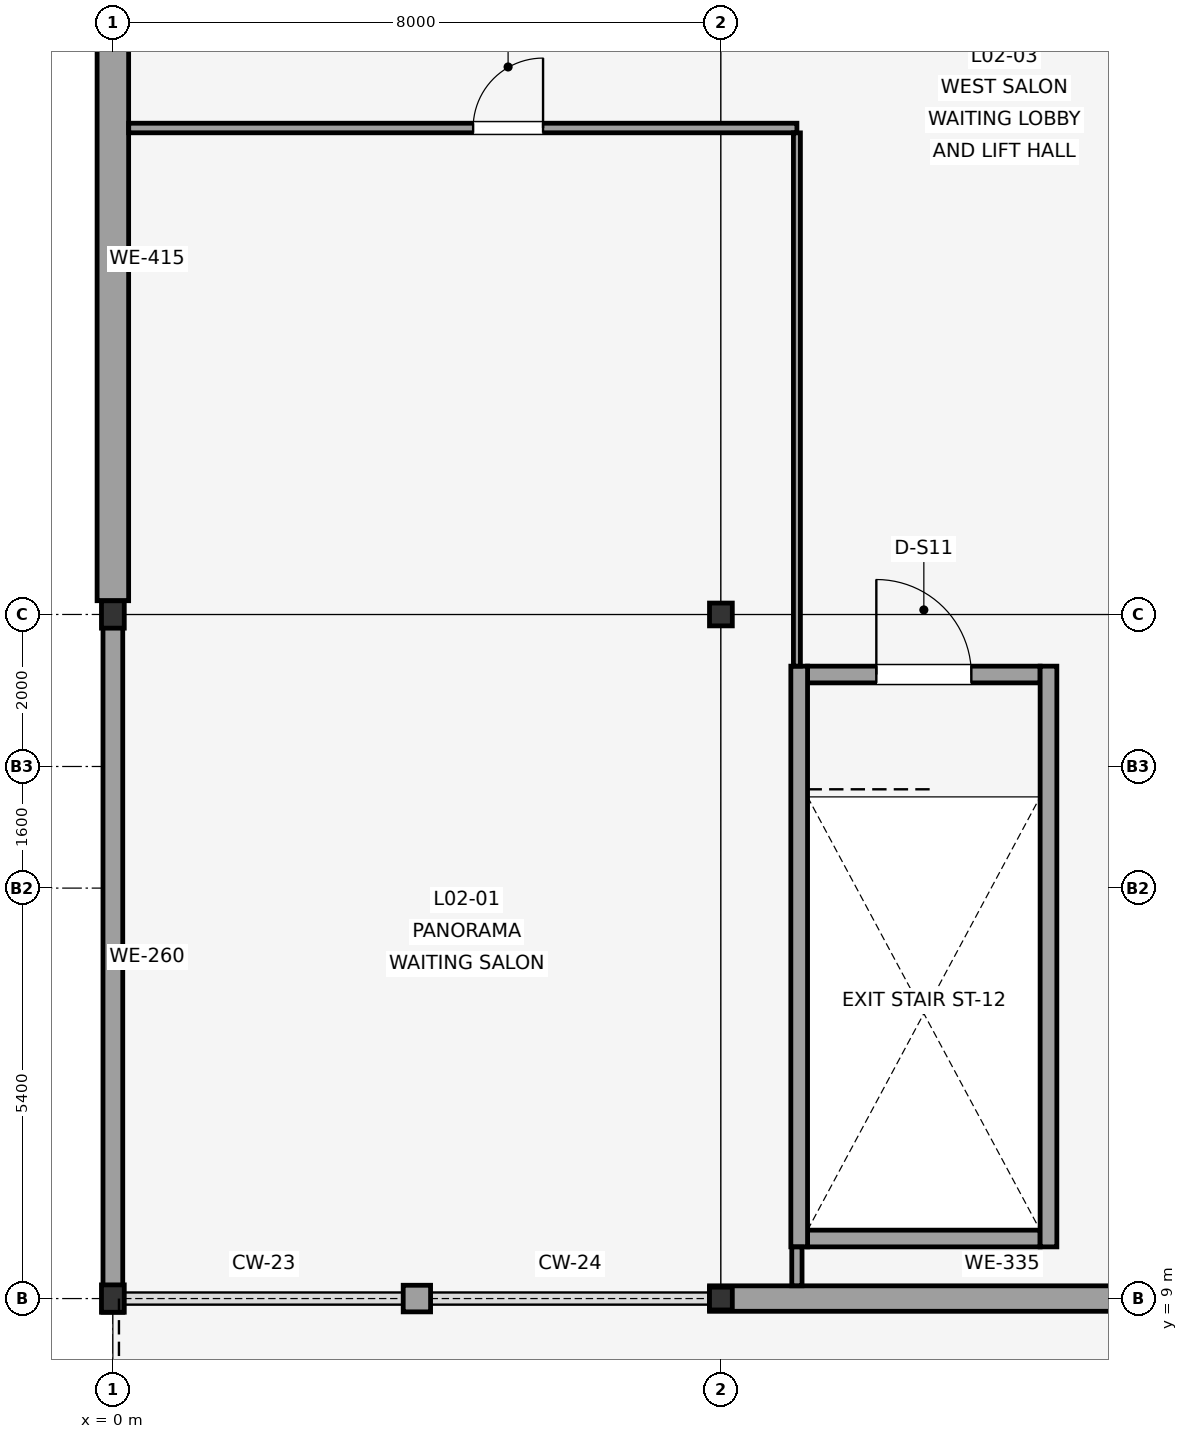
"""IFC4 building model, lengths in metres.
Left out: names, types, materials, properties, quantities, classifications, styles, units other than length and angle.
Written with IfcOpenShell. Run it as: python <this file> out.ifc"""

import sys

from ifc_helpers import new_model, si_unit, direction, frame, frame_2d, origin, origin_2d, place, context, subcontext, project, spatial, rectangle, i_section, extrude, element, fill, save


model = new_model("IFC4")
c1 = context("Model", 3, precision=1e-05, world=origin(), true_north=direction((0.0, 1.0)))
c2 = subcontext(c1, "Body", "Model", "MODEL_VIEW")
j1 = project(units=[si_unit("LENGTHUNIT", "METRE"), si_unit("PLANEANGLEUNIT", "RADIAN")], contexts=[c1])
p1 = place(None, origin())
s1 = spatial("IfcSite", under=j1, at=p1, CompositionType="ELEMENT")
p2 = place(p1, origin())
s2 = spatial("IfcBuilding", under=s1, at=p2, CompositionType="ELEMENT")
p3 = place(p2, frame((0.0, 0.0, 9.0)))
s3 = spatial("IfcBuildingStorey", under=s2, at=p3, CompositionType="ELEMENT", Elevation=9.0)
for number, where, z_axis, x_axis in (
    (1, (0.0, 9.0, 0.0), (0.0, 0.0, 1.0), (1.0, 0.0, 0.0)),
    (2, (0.0, 18.0, 0.0), (0.0, 0.0, 1.0), (1.0, 0.0, 0.0)),
):
    element("IfcColumn", number, at=place(p3, frame(where, z_axis=z_axis, x_axis=x_axis)), inside=s3, PredefinedType="COLUMN", context=c2, shape_type="SweptSolid", body=[
        extrude(i_section(OverallWidth=0.3, OverallDepth=0.36, WebThickness=0.012, FlangeThickness=0.022, FilletRadius=0.027, at=origin_2d()), origin(), (0.0, 0.0, 1.0), 4.8),
    ])
for number, where, z_axis, x_axis in (
    (3, (8.0, 9.0, 0.0), (0.0, 0.0, 1.0), (1.0, 0.0, 0.0)),
    (4, (8.0, 18.0, 0.0), (0.0, 0.0, 1.0), (1.0, 0.0, 0.0)),
):
    element("IfcColumn", number, at=place(p3, frame(where, z_axis=z_axis, x_axis=x_axis)), inside=s3, PredefinedType="COLUMN", context=c2, shape_type="SweptSolid", body=[
        extrude(i_section(OverallWidth=0.3, OverallDepth=0.3, WebThickness=0.011, FlangeThickness=0.019, FilletRadius=0.027, at=origin_2d()), origin(), (0.0, 0.0, 1.0), 4.8),
    ])
p4 = place(p3, frame((3.82, 9.0, 0.0), z_axis=(0.0, 0.0, 1.0), x_axis=(1.0, 0.0, 0.0)))
e5 = element("IfcWall", 5, at=p4, inside=s3, PredefinedType="SOLIDWALL", context=c2, shape_type="SweptSolid", body=[
    extrude(rectangle(XDim=0.36, YDim=0.35, at=frame_2d((0.18, 0.0))), origin(), (0.0, 0.0, 1.0), 3.42),
])
p5 = place(p3, frame((7.85, 9.0, 0.0), z_axis=(0.0, 0.0, 1.0), x_axis=(1.0, 0.0, 0.0)))
e6 = element("IfcWall", 6, at=p5, inside=s3, PredefinedType="SOLIDWALL", context=c2, shape_type="SweptSolid", body=[
    extrude(rectangle(XDim=8.3, YDim=0.335, at=frame_2d((4.15, 0.0))), origin(), (0.0, 0.0, 1.0), 3.42),
])
p6 = place(p5, frame((5.45, 0.0, 0.0)))
e7 = element("IfcOpeningElement", 7, at=p6, cuts=e6, PredefinedType="OPENING", context=c2, shape_type="SweptSolid", body=[
    extrude(rectangle(XDim=1.65, YDim=2.3, at=frame_2d((0.825, 1.15))), frame((0.0, 0.177, 0.0), z_axis=(0.0, -1.0, 0.0), x_axis=(1.0, 0.0, 0.0)), (0.0, 0.0, 1.0), 0.355),
])
p7 = place(p3, frame((0.0, 18.18, 0.0), z_axis=(0.0, 0.0, 1.0), x_axis=(0.0, -1.0, 0.0)))
e8 = element("IfcWall", 8, at=p7, inside=s3, PredefinedType="SOLIDWALL", context=c2, shape_type="SweptSolid", body=[
    extrude(rectangle(XDim=9.36, YDim=0.26, at=frame_2d((4.68, 0.0))), origin(), (0.0, 0.0, 1.0), 3.42),
])
p8 = place(p3, frame((0.0, 27.18, 0.0), z_axis=(0.0, 0.0, 1.0), x_axis=(0.0, -1.0, 0.0)))
e9 = element("IfcWall", 9, at=p8, inside=s3, PredefinedType="SOLIDWALL", context=c2, shape_type="SweptSolid", body=[
    extrude(rectangle(XDim=8.999, YDim=0.415, at=frame_2d((4.5, 0.0))), origin(), (0.0, 0.0, 1.0), 3.42),
])
p9 = place(p3, frame((9.14, 17.21, 0.0), z_axis=(0.0, 0.0, 1.0), x_axis=(1.0, 0.0, 0.0)))
e10 = element("IfcWall", 10, at=p9, inside=s3, PredefinedType="SHEAR", context=c2, shape_type="SweptSolid", body=[
    extrude(rectangle(XDim=3.06, YDim=0.22, at=frame_2d((1.53, 0.0))), origin(), (0.0, 0.0, 1.0), 4.8),
])
p10 = place(p9, frame((0.905, 0.0, 0.0)))
e11 = element("IfcOpeningElement", 11, at=p10, cuts=e10, PredefinedType="OPENING", context=c2, shape_type="SweptSolid", body=[
    extrude(rectangle(XDim=1.25, YDim=2.15, at=frame_2d((0.625, 1.075))), frame((0.0, 0.12, 0.0), z_axis=(0.0, -1.0, 0.0), x_axis=(1.0, 0.0, 0.0)), (0.0, 0.0, 1.0), 0.24),
])
p11 = place(p3, frame((9.14, 9.79, 0.0), z_axis=(0.0, 0.0, 1.0), x_axis=(1.0, 0.0, 0.0)))
e12 = element("IfcWall", 12, at=p11, inside=s3, PredefinedType="SHEAR", context=c2, shape_type="SweptSolid", body=[
    extrude(rectangle(XDim=3.06, YDim=0.22, at=frame_2d((1.53, 0.0))), origin(), (0.0, 0.0, 1.0), 4.8),
])
for number, where, z_axis, x_axis in (
    (13, (9.03, 17.32, 0.0), (0.0, 0.0, 1.0), (0.0, -1.0, 0.0)),
    (14, (12.31, 17.32, 0.0), (0.0, 0.0, 1.0), (0.0, -1.0, 0.0)),
):
    element("IfcWall", number, at=place(p3, frame(where, z_axis=z_axis, x_axis=x_axis)), inside=s3, PredefinedType="SHEAR", context=c2, shape_type="SweptSolid", body=[
        extrude(rectangle(XDim=7.64, YDim=0.22, at=frame_2d((3.82, 0.0))), origin(), (0.0, 0.0, 1.0), 4.8),
    ])
p12 = place(p3, frame((0.208, 24.4, 0.0), z_axis=(0.0, 0.0, 1.0), x_axis=(1.0, 0.0, 0.0)))
e15 = element("IfcWall", 15, at=p12, inside=s3, PredefinedType="MOVABLE", context=c2, shape_type="SweptSolid", body=[
    extrude(rectangle(XDim=8.792, YDim=0.126, at=frame_2d((4.396, 0.0))), origin(), (0.0, 0.0, 1.0), 2.7),
])
p13 = place(p12, frame((4.531, 0.0, 0.0)))
e16 = element("IfcOpeningElement", 16, at=p13, cuts=e15, PredefinedType="OPENING", context=c2, shape_type="SweptSolid", body=[
    extrude(rectangle(XDim=0.92, YDim=2.12, at=frame_2d((0.46, 1.06))), frame((0.0, 0.073, 0.0), z_axis=(0.0, -1.0, 0.0), x_axis=(1.0, 0.0, 0.0)), (0.0, 0.0, 1.0), 0.146),
])
p14 = place(p3, frame((9.0, 24.336, 0.0), z_axis=(0.0, 0.0, 1.0), x_axis=(0.0, -1.0, 0.0)))
e17 = element("IfcWall", 17, at=p14, inside=s3, PredefinedType="PARTITIONING", context=c2, shape_type="SweptSolid", body=[
    extrude(rectangle(XDim=7.015, YDim=0.092, at=frame_2d((3.507, 0.0))), origin(), (0.0, 0.0, 1.0), 2.7),
])
p15 = place(p3, frame((9.0, 9.679, 0.0), z_axis=(0.0, 0.0, 1.0), x_axis=(0.0, -1.0, 0.0)))
e18 = element("IfcWall", 18, at=p15, inside=s3, PredefinedType="PARTITIONING", context=c2, shape_type="SweptSolid", body=[
    extrude(rectangle(XDim=0.51, YDim=0.135, at=frame_2d((0.255, 0.0))), origin(), (0.0, 0.0, 1.0), 2.7),
])
p16 = place(p10, origin())
e19 = element("IfcDoor", 19, at=p16, inside=s3, OperationType="SINGLE_SWING_LEFT", PredefinedType="DOOR", context=c2, shape_type="SweptSolid", body=[
    extrude(rectangle(XDim=1.25, YDim=2.15, at=frame_2d((0.625, 1.075))), frame((0.0, 0.025, 0.0), z_axis=(0.0, -1.0, 0.0), x_axis=(1.0, 0.0, 0.0)), (0.0, 0.0, 1.0), 0.05),
])
fill(e11, e19)
p17 = place(p13, origin())
e20 = element("IfcDoor", 20, at=p17, inside=s3, OperationType="SINGLE_SWING_RIGHT", PredefinedType="DOOR", context=c2, shape_type="SweptSolid", body=[
    extrude(rectangle(XDim=0.92, YDim=2.12, at=frame_2d((0.46, 1.06))), frame((0.0, 0.025, 0.0), z_axis=(0.0, -1.0, 0.0), x_axis=(1.0, 0.0, 0.0)), (0.0, 0.0, 1.0), 0.05),
])
fill(e16, e20)
save(model, sys.argv[1])
